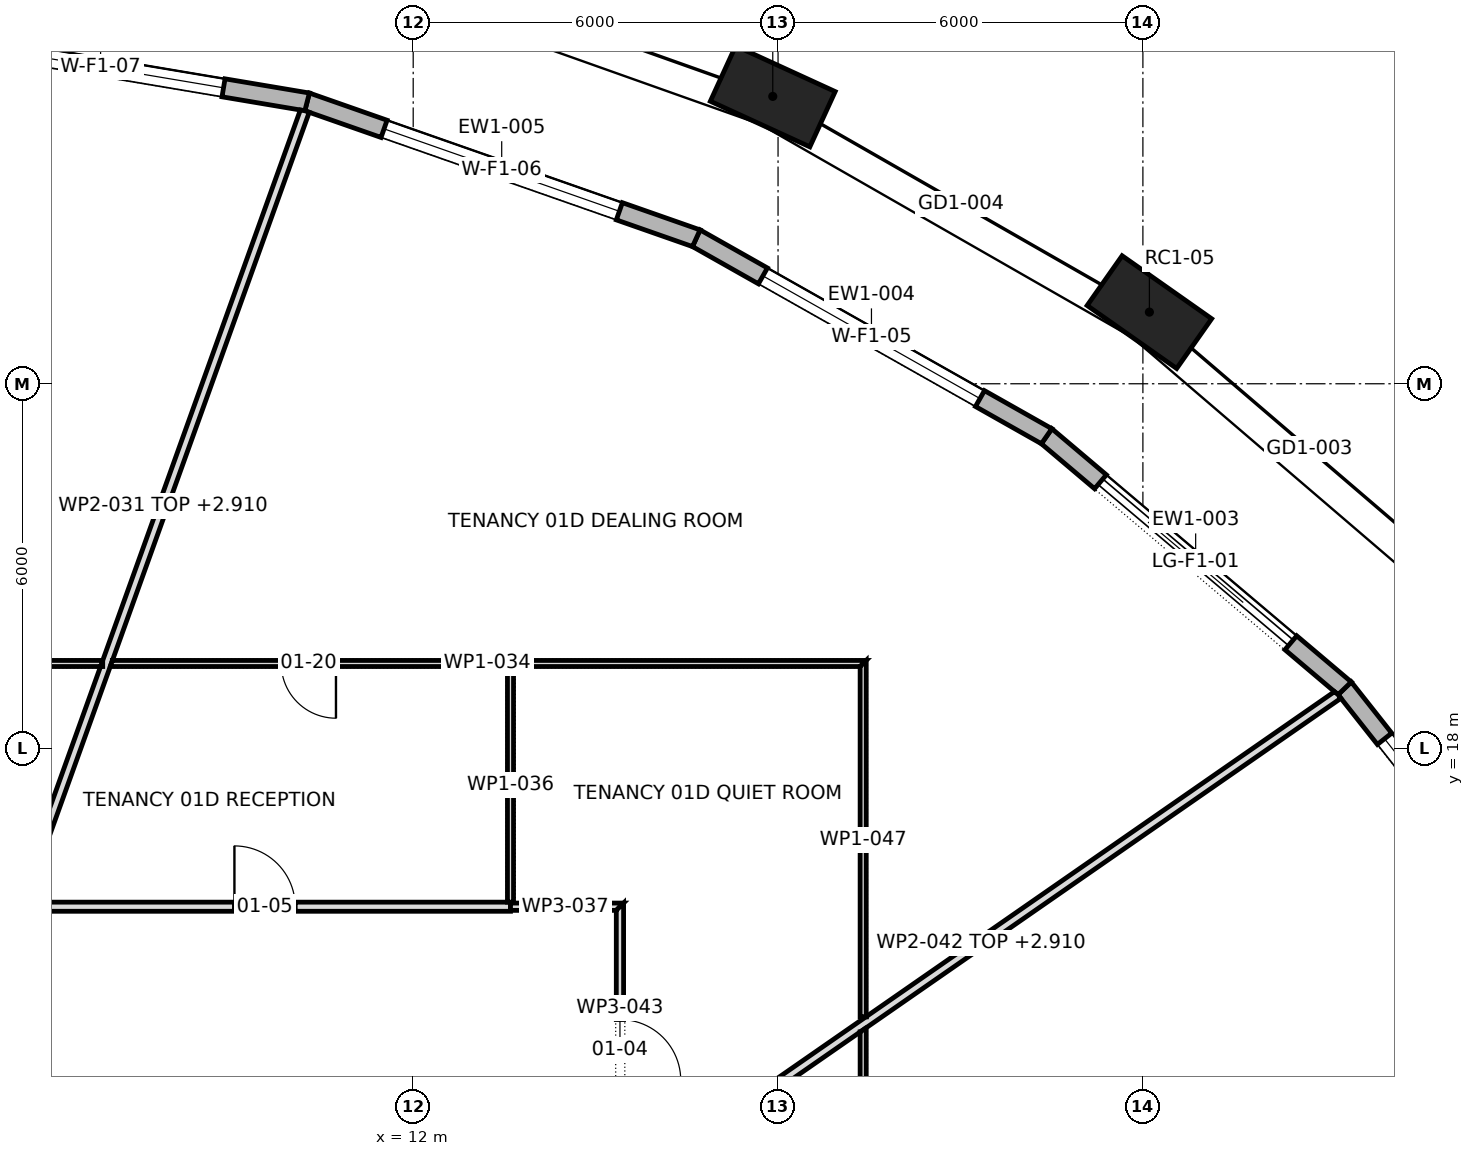
"""IFC4 building model, lengths in metres.
Left out: names, types, materials, properties, quantities, classifications, styles, units other than length and angle.
Written with IfcOpenShell. Run it as: python <this file> out.ifc"""

import sys

from ifc_helpers import new_model, si_unit, direction, frame, frame_2d, origin, origin_2d, place, context, subcontext, project, spatial, polyline, rectangle, outline, extrude, element, fill, save


model = new_model("IFC4")
c1 = context("Model", 3, precision=1e-05, world=origin(), true_north=direction((0.0, 1.0)))
c2 = subcontext(c1, "Body", "Model", "MODEL_VIEW")
j1 = project(units=[si_unit("LENGTHUNIT", "METRE"), si_unit("PLANEANGLEUNIT", "RADIAN")], contexts=[c1])
p1 = place(None, origin())
s1 = spatial("IfcSite", under=j1, at=p1, CompositionType="ELEMENT")
p2 = place(p1, origin())
s2 = spatial("IfcBuilding", under=s1, at=p2, CompositionType="ELEMENT")
p3 = place(p2, frame((0.0, 0.0, 27.7)))
s3 = spatial("IfcBuildingStorey", under=s2, at=p3, CompositionType="ELEMENT", Elevation=27.7)
for number, where, z_axis, x_axis in (
    (1, (24.107, 25.178, 0.0), (0.0, 0.0, 1.0), (-0.818, 0.575, 0.0)),
    (2, (17.913, 28.725, 0.0), (0.0, 0.0, 1.0), (-0.909, 0.417, 0.0)),
):
    element("IfcColumn", number, at=place(p3, frame(where, z_axis=z_axis, x_axis=x_axis)), inside=s3, PredefinedType="COLUMN", context=c2, shape_type="SweptSolid", body=[
        extrude(rectangle(XDim=1.8, YDim=1.0, at=origin_2d()), origin(), (0.0, 0.0, 1.0), 4.2),
    ])
p4 = place(p3, frame((31.171, 14.115, 0.0), z_axis=(0.0, 0.0, 1.0), x_axis=(-0.619902786528, 0.784678619089, 0.0)))
e3 = element("IfcWall", 3, at=p4, inside=s3, PredefinedType="STANDARD", context=c2, shape_type="SweptSolid", body=[
    extrude(outline(polyline([(-0.016, -0.15), (6.231, -0.15), (6.2, 0.15), (0.016, 0.15), (-0.016, -0.15)])), origin(), (0.0, 0.0, 1.0), 3.9),
])
p5 = place(p4, frame((1.058, 0.0, 0.6)))
e4 = element("IfcOpeningElement", 4, at=p5, cuts=e3, PredefinedType="OPENING", context=c2, shape_type="SweptSolid", body=[
    extrude(rectangle(XDim=4.1, YDim=2.85, at=frame_2d((2.05, 1.425))), frame((0.0, 0.162, 0.0), z_axis=(0.0, -1.0, 0.0), x_axis=(1.0, 0.0, 0.0)), (0.0, 0.0, 1.0), 0.324),
])
p6 = place(p3, frame((27.318, 18.992, 0.0), z_axis=(0.0, 0.0, 1.0), x_axis=(-0.763540615407, 0.645759807223, 0.0)))
e5 = element("IfcWall", 5, at=p6, inside=s3, PredefinedType="STANDARD", context=c2, shape_type="SweptSolid", body=[
    extrude(outline(polyline([(-0.015, -0.15), (6.434, -0.15), (6.406, 0.15), (0.015, 0.15), (-0.015, -0.15)])), origin(), (0.0, 0.0, 1.0), 3.9),
])
p7 = place(p6, frame((1.16, 0.0, 0.0)))
e6 = element("IfcOpeningElement", 6, at=p7, cuts=e5, PredefinedType="OPENING", context=c2, shape_type="SweptSolid", body=[
    extrude(rectangle(XDim=4.1, YDim=3.45, at=frame_2d((2.05, 1.725))), frame((0.0, 0.162, 0.0), z_axis=(0.0, -1.0, 0.0), x_axis=(1.0, 0.0, 0.0)), (0.0, 0.0, 1.0), 0.324),
])
p8 = place(p3, frame((22.417, 23.137, 0.0), z_axis=(0.0, 0.0, 1.0), x_axis=(-0.8705786416, 0.492029296678, 0.0)))
e7 = element("IfcWall", 7, at=p8, inside=s3, PredefinedType="STANDARD", context=c2, shape_type="SweptSolid", body=[
    extrude(outline(polyline([(-0.014, -0.15), (6.631, -0.15), (6.604, 0.15), (0.014, 0.15), (-0.014, -0.15)])), origin(), (0.0, 0.0, 1.0), 3.9),
])
p9 = place(p8, frame((1.259, 0.0, 0.6)))
e8 = element("IfcOpeningElement", 8, at=p9, cuts=e7, PredefinedType="OPENING", context=c2, shape_type="SweptSolid", body=[
    extrude(rectangle(XDim=4.1, YDim=2.85, at=frame_2d((2.05, 1.425))), frame((0.0, 0.162, 0.0), z_axis=(0.0, -1.0, 0.0), x_axis=(1.0, 0.0, 0.0)), (0.0, 0.0, 1.0), 0.324),
])
p10 = place(p3, frame((16.656, 26.393, 0.0), z_axis=(0.0, 0.0, 1.0), x_axis=(-0.943767392455, 0.330610206947, 0.0)))
e9 = element("IfcWall", 9, at=p10, inside=s3, PredefinedType="STANDARD", context=c2, shape_type="SweptSolid", body=[
    extrude(outline(polyline([(-0.013, -0.15), (6.794, -0.15), (6.769, 0.15), (0.013, 0.15), (-0.013, -0.15)])), origin(), (0.0, 0.0, 1.0), 3.9),
])
p11 = place(p10, frame((1.341, 0.0, 0.6)))
e10 = element("IfcOpeningElement", 10, at=p11, cuts=e9, PredefinedType="OPENING", context=c2, shape_type="SweptSolid", body=[
    extrude(rectangle(XDim=4.1, YDim=2.85, at=frame_2d((2.05, 1.425))), frame((0.0, 0.162, 0.0), z_axis=(0.0, -1.0, 0.0), x_axis=(1.0, 0.0, 0.0)), (0.0, 0.0, 1.0), 0.324),
])
p12 = place(p3, frame((10.256, 28.635, 0.0), z_axis=(0.0, 0.0, 1.0), x_axis=(-0.986141805867, 0.165904607291, 0.0)))
e11 = element("IfcWall", 11, at=p12, inside=s3, PredefinedType="STANDARD", context=c2, shape_type="SweptSolid", body=[
    extrude(outline(polyline([(-0.013, -0.15), (6.901, -0.15), (6.876, 0.15), (0.013, 0.15), (-0.013, -0.15)])), origin(), (0.0, 0.0, 1.0), 3.9),
])
p13 = place(p12, frame((1.394, 0.0, 0.6)))
e12 = element("IfcOpeningElement", 12, at=p13, cuts=e11, PredefinedType="OPENING", context=c2, shape_type="SweptSolid", body=[
    extrude(rectangle(XDim=4.1, YDim=2.85, at=frame_2d((2.05, 1.425))), frame((0.0, 0.162, 0.0), z_axis=(0.0, -1.0, 0.0), x_axis=(1.0, 0.0, 0.0)), (0.0, 0.0, 1.0), 0.324),
])
p14 = place(p3, frame((-12.2, 19.4, 0.0), z_axis=(0.0, 0.0, 1.0), x_axis=(1.0, 0.0, 0.0)))
e13 = element("IfcWall", 13, at=p14, inside=s3, PredefinedType="PARTITIONING", context=c2, shape_type="SweptSolid", body=[
    extrude(outline(polyline([(0.063, -0.05), (1.754, -0.05), (3.446, -0.05), (5.137, -0.05), (6.829, -0.05), (8.52, -0.05), (8.52, -0.05), (8.62, -0.05), (8.62, -0.05), (10.36, -0.05), (12.099, -0.05), (13.839, -0.05), (15.579, -0.05), (17.319, -0.05), (19.058, -0.05), (19.094, 0.049), (19.094, 0.05), (17.185, 0.05), (15.275, 0.05), (13.366, 0.05), (11.456, 0.05), (9.547, 0.05), (7.638, 0.05), (5.728, 0.05), (3.819, 0.05), (1.909, 0.05), (0.0, 0.05), (0.0, 0.05), (0.063, -0.05)])), origin(), (0.0, 0.0, 1.0), 3.9),
])
p15 = place(p14, frame((13.415, 0.0, 0.0)))
e14 = element("IfcOpeningElement", 14, at=p15, cuts=e13, PredefinedType="OPENING", context=c2, shape_type="SweptSolid", body=[
    extrude(rectangle(XDim=0.9, YDim=2.1, at=frame_2d((0.45, 1.05))), frame((0.0, 0.062, 0.0), z_axis=(0.0, -1.0, 0.0), x_axis=(1.0, 0.0, 0.0)), (0.0, 0.0, 1.0), 0.124),
])
p16 = place(p3, frame((-9.73, 15.4, 0.0), z_axis=(0.0, 0.0, 1.0), x_axis=(1.0, 0.0, 0.0)))
e15 = element("IfcWall", 15, at=p16, inside=s3, PredefinedType="PARTITIONING", context=c2, shape_type="SweptSolid", body=[
    extrude(rectangle(XDim=23.33, YDim=0.15, at=frame_2d((11.665, 0.0))), origin(), (0.0, 0.0, 1.0), 3.9),
])
p17 = place(p16, frame((18.79, 0.0, 0.0)))
e16 = element("IfcOpeningElement", 16, at=p17, cuts=e15, PredefinedType="OPENING", context=c2, shape_type="SweptSolid", body=[
    extrude(rectangle(XDim=1.0, YDim=2.1, at=frame_2d((0.5, 1.05))), frame((0.0, 0.087, 0.0), z_axis=(0.0, -1.0, 0.0), x_axis=(1.0, 0.0, 0.0)), (0.0, 0.0, 1.0), 0.174),
])
p18 = place(p16, frame((10.175, 0.0, 0.0)))
e17 = element("IfcOpeningElement", 17, at=p18, cuts=e15, PredefinedType="OPENING", context=c2, shape_type="SweptSolid", body=[
    extrude(rectangle(XDim=1.0, YDim=2.1, at=frame_2d((0.5, 1.05))), frame((0.0, 0.087, 0.0), z_axis=(0.0, -1.0, 0.0), x_axis=(1.0, 0.0, 0.0)), (0.0, 0.0, 1.0), 0.174),
])
p19 = place(p16, frame((2.55, 0.0, 0.0)))
e18 = element("IfcOpeningElement", 18, at=p19, cuts=e15, PredefinedType="OPENING", context=c2, shape_type="SweptSolid", body=[
    extrude(rectangle(XDim=1.0, YDim=2.1, at=frame_2d((0.5, 1.05))), frame((0.0, 0.087, 0.0), z_axis=(0.0, -1.0, 0.0), x_axis=(1.0, 0.0, 0.0)), (0.0, 0.0, 1.0), 0.174),
])
p20 = place(p3, frame((5.538, 15.45, 0.0), z_axis=(0.0, 0.0, 1.0), x_axis=(0.337914385466, 0.94117685272, 0.0)))
e19 = element("IfcWall", 19, at=p20, inside=s3, PredefinedType="PARTITIONING", context=c2, shape_type="SweptSolid", body=[
    extrude(outline(polyline([(0.053, -0.075), (1.46, -0.075), (2.867, -0.075), (4.274, -0.075), (4.277, -0.074), (4.277, -0.075), (6.192, -0.075), (8.108, -0.075), (10.023, -0.075), (11.939, -0.075), (13.854, -0.075), (13.854, -0.063), (13.854, 0.001), (13.841, 0.075), (11.917, 0.075), (9.993, 0.075), (8.07, 0.075), (6.146, 0.075), (4.222, 0.075), (4.129, 0.042), (4.117, 0.075), (2.745, 0.075), (1.372, 0.075), (0.0, 0.075), (0.0, 0.074), (0.053, -0.075)])), origin(), (0.0, 0.0, 1.0), 2.91),
])
p21 = place(p3, frame((7.018, 19.4, 0.0), z_axis=(0.0, 0.0, 1.0), x_axis=(1.0, 0.0, 0.0)))
e20 = element("IfcWall", 20, at=p21, inside=s3, PredefinedType="PARTITIONING", context=c2, shape_type="SweptSolid", body=[
    extrude(outline(polyline([(0.0, -0.05), (1.633, -0.05), (3.266, -0.05), (4.899, -0.05), (6.532, -0.05), (6.532, -0.05), (6.632, -0.05), (6.632, -0.05), (8.532, -0.05), (10.432, -0.05), (12.332, -0.05), (12.332, -0.05), (12.432, 0.05), (10.661, 0.05), (8.89, 0.05), (7.119, 0.05), (5.348, 0.05), (3.577, 0.05), (1.807, 0.05), (0.036, 0.05), (0.0, -0.049), (0.0, -0.05)])), origin(), (0.0, 0.0, 1.0), 3.9),
])
p22 = place(p21, frame((2.812, 0.0, 0.0)))
e21 = element("IfcOpeningElement", 21, at=p22, cuts=e20, PredefinedType="OPENING", context=c2, shape_type="SweptSolid", body=[
    extrude(rectangle(XDim=0.9, YDim=2.1, at=frame_2d((0.45, 1.05))), frame((0.0, 0.062, 0.0), z_axis=(0.0, -1.0, 0.0), x_axis=(1.0, 0.0, 0.0)), (0.0, 0.0, 1.0), 0.124),
])
p23 = place(p3, frame((13.6, 15.46, 0.0), z_axis=(0.0, 0.0, 1.0), x_axis=(0.0, 1.0, 0.0)))
e22 = element("IfcWall", 22, at=p23, inside=s3, PredefinedType="PARTITIONING", context=c2, shape_type="SweptSolid", body=[
    extrude(outline(polyline([(0.0, -0.05), (1.945, -0.05), (3.89, -0.05), (3.89, 0.05), (1.952, 0.05), (0.015, 0.05), (0.015, 0.0), (0.0, 0.0), (0.0, -0.05)])), origin(), (0.0, 0.0, 1.0), 3.9),
])
p24 = place(p3, frame((13.6, 15.4, 0.0), z_axis=(0.0, 0.0, 1.0), x_axis=(1.0, 0.0, 0.0)))
e23 = element("IfcWall", 23, at=p24, inside=s3, PredefinedType="PARTITIONING", context=c2, shape_type="SweptSolid", body=[
    extrude(outline(polyline([(0.0, -0.06), (1.74, -0.06), (1.86, 0.06), (0.0, 0.06), (0.0, -0.06)])), origin(), (0.0, 0.0, 1.0), 3.9),
])
p25 = place(p3, frame((15.433, 10.712, 0.0), z_axis=(0.0, 0.0, 1.0), x_axis=(0.82152236589, 0.570176290583, 0.0)))
e24 = element("IfcWall", 24, at=p25, inside=s3, PredefinedType="PARTITIONING", context=c2, shape_type="SweptSolid", body=[
    extrude(outline(polyline([(0.0, -0.075), (1.572, -0.075), (3.144, -0.075), (4.716, -0.075), (4.718, -0.073), (4.721, -0.075), (6.645, -0.075), (8.569, -0.075), (10.493, -0.075), (12.417, -0.075), (14.341, -0.075), (14.341, -0.074), (14.336, 0.0), (14.316, 0.075), (12.441, 0.075), (10.567, 0.075), (8.692, 0.075), (6.817, 0.075), (4.942, 0.075), (4.941, 0.073), (4.939, 0.075), (3.321, 0.075), (1.703, 0.075), (0.085, 0.075), (0.01, -0.034), (0.022, -0.042), (0.0, -0.074), (0.0, -0.075)])), origin(), (0.0, 0.0, 1.0), 2.91),
])
p26 = place(p3, frame((15.4, 15.46, 0.0), z_axis=(0.0, 0.0, 1.0), x_axis=(0.0, -1.0, 0.0)))
e25 = element("IfcWall", 25, at=p26, inside=s3, PredefinedType="PARTITIONING", context=c2, shape_type="SweptSolid", body=[
    extrude(outline(polyline([(4.77, 0.06), (3.18, 0.06), (1.59, 0.06), (0.0, 0.06), (0.12, -0.06), (1.67, -0.06), (3.22, -0.06), (4.77, -0.06), (4.77, 0.06)])), origin(), (0.0, 0.0, 1.0), 3.9),
])
p27 = place(p26, frame((1.915, 0.0, 0.0)))
e26 = element("IfcOpeningElement", 26, at=p27, cuts=e25, PredefinedType="OPENING", context=c2, shape_type="SweptSolid", body=[
    extrude(rectangle(XDim=1.0, YDim=2.1, at=frame_2d((0.5, 1.05))), frame((0.0, 0.072, 0.0), z_axis=(0.0, -1.0, 0.0), x_axis=(1.0, 0.0, 0.0)), (0.0, 0.0, 1.0), 0.144),
])
p28 = place(p3, frame((19.4, 13.409, 0.0), z_axis=(0.0, 0.0, 1.0), x_axis=(0.0, -1.0, 0.0)))
e27 = element("IfcWall", 27, at=p28, inside=s3, PredefinedType="PARTITIONING", context=c2, shape_type="SweptSolid", body=[
    extrude(outline(polyline([(8.367, -0.05), (8.367, -0.048), (8.342, 0.05), (6.673, 0.05), (5.005, 0.05), (3.337, 0.05), (1.668, 0.05), (0.0, 0.05), (0.0, 0.049), (0.069, -0.05), (1.729, -0.05), (3.388, -0.05), (5.048, -0.05), (6.707, -0.05), (8.367, -0.05)])), origin(), (0.0, 0.0, 1.0), 3.9),
])
p29 = place(p28, frame((3.734, 0.0, 0.0)))
e28 = element("IfcOpeningElement", 28, at=p29, cuts=e27, PredefinedType="OPENING", context=c2, shape_type="SweptSolid", body=[
    extrude(rectangle(XDim=0.9, YDim=2.1, at=frame_2d((0.45, 1.05))), frame((0.0, 0.062, 0.0), z_axis=(0.0, -1.0, 0.0), x_axis=(1.0, 0.0, 0.0)), (0.0, 0.0, 1.0), 0.124),
])
p30 = place(p3, frame((19.4, 19.45, 0.0), z_axis=(0.0, 0.0, 1.0), x_axis=(0.0, -1.0, 0.0)))
e29 = element("IfcWall", 29, at=p30, inside=s3, PredefinedType="PARTITIONING", context=c2, shape_type="SweptSolid", body=[
    extrude(outline(polyline([(5.86, 0.05), (3.906, 0.05), (1.953, 0.05), (0.0, 0.05), (0.1, -0.05), (2.02, -0.05), (3.94, -0.05), (5.86, -0.05), (5.86, 0.05)])), origin(), (0.0, 0.0, 1.0), 3.9),
])
p31 = place(p5, origin())
e30 = element("IfcWindow", 30, at=p31, inside=s3, PartitioningType="TRIPLE_PANEL_VERTICAL", PredefinedType="WINDOW", context=c2, shape_type="SweptSolid", body=[
    extrude(rectangle(XDim=4.1, YDim=2.85, at=frame_2d((2.05, 1.425))), frame((0.0, 0.03, 0.0), z_axis=(0.0, -1.0, 0.0), x_axis=(1.0, 0.0, 0.0)), (0.0, 0.0, 1.0), 0.06),
])
fill(e4, e30)
p32 = place(p7, origin())
e31 = element("IfcDoor", 31, at=p32, inside=s3, OperationType="DOUBLE_DOOR_SLIDING", PredefinedType="DOOR", context=c2, shape_type="SweptSolid", body=[
    extrude(rectangle(XDim=4.1, YDim=3.45, at=frame_2d((2.05, 1.725))), frame((0.0, 0.025, 0.0), z_axis=(0.0, -1.0, 0.0), x_axis=(1.0, 0.0, 0.0)), (0.0, 0.0, 1.0), 0.05),
])
fill(e6, e31)
p33 = place(p9, origin())
e32 = element("IfcWindow", 32, at=p33, inside=s3, PartitioningType="TRIPLE_PANEL_VERTICAL", PredefinedType="WINDOW", context=c2, shape_type="SweptSolid", body=[
    extrude(rectangle(XDim=4.1, YDim=2.85, at=frame_2d((2.05, 1.425))), frame((0.0, 0.03, 0.0), z_axis=(0.0, -1.0, 0.0), x_axis=(1.0, 0.0, 0.0)), (0.0, 0.0, 1.0), 0.06),
])
fill(e8, e32)
p34 = place(p11, origin())
e33 = element("IfcWindow", 33, at=p34, inside=s3, PartitioningType="TRIPLE_PANEL_VERTICAL", PredefinedType="WINDOW", context=c2, shape_type="SweptSolid", body=[
    extrude(rectangle(XDim=4.1, YDim=2.85, at=frame_2d((2.05, 1.425))), frame((0.0, 0.03, 0.0), z_axis=(0.0, -1.0, 0.0), x_axis=(1.0, 0.0, 0.0)), (0.0, 0.0, 1.0), 0.06),
])
fill(e10, e33)
p35 = place(p13, origin())
e34 = element("IfcWindow", 34, at=p35, inside=s3, PartitioningType="TRIPLE_PANEL_VERTICAL", PredefinedType="WINDOW", context=c2, shape_type="SweptSolid", body=[
    extrude(rectangle(XDim=4.1, YDim=2.85, at=frame_2d((2.05, 1.425))), frame((0.0, 0.03, 0.0), z_axis=(0.0, -1.0, 0.0), x_axis=(1.0, 0.0, 0.0)), (0.0, 0.0, 1.0), 0.06),
])
fill(e12, e34)
p36 = place(p27, origin())
e35 = element("IfcDoor", 35, at=p36, inside=s3, OperationType="SINGLE_SWING_LEFT", PredefinedType="DOOR", context=c2, shape_type="SweptSolid", body=[
    extrude(rectangle(XDim=1.0, YDim=2.1, at=frame_2d((0.5, 1.05))), frame((0.0, 0.025, 0.0), z_axis=(0.0, -1.0, 0.0), x_axis=(1.0, 0.0, 0.0)), (0.0, 0.0, 1.0), 0.05),
])
fill(e26, e35)
p37 = place(p17, origin())
e36 = element("IfcDoor", 36, at=p37, inside=s3, OperationType="SINGLE_SWING_RIGHT", PredefinedType="DOOR", context=c2, shape_type="SweptSolid", body=[
    extrude(rectangle(XDim=1.0, YDim=2.1, at=frame_2d((0.5, 1.05))), frame((0.0, 0.025, 0.0), z_axis=(0.0, -1.0, 0.0), x_axis=(1.0, 0.0, 0.0)), (0.0, 0.0, 1.0), 0.05),
])
fill(e16, e36)
p38 = place(p22, frame((0.9, 0.0, 0.0), z_axis=(0.0, 0.0, 1.0), x_axis=(-1.0, 0.0, 0.0)))
e37 = element("IfcDoor", 37, at=p38, inside=s3, OperationType="SINGLE_SWING_RIGHT", PredefinedType="DOOR", context=c2, shape_type="SweptSolid", body=[
    extrude(rectangle(XDim=0.9, YDim=2.1, at=frame_2d((0.45, 1.05))), frame((0.0, 0.025, 0.0), z_axis=(0.0, -1.0, 0.0), x_axis=(1.0, 0.0, 0.0)), (0.0, 0.0, 1.0), 0.05),
])
fill(e21, e37)
save(model, sys.argv[1])
